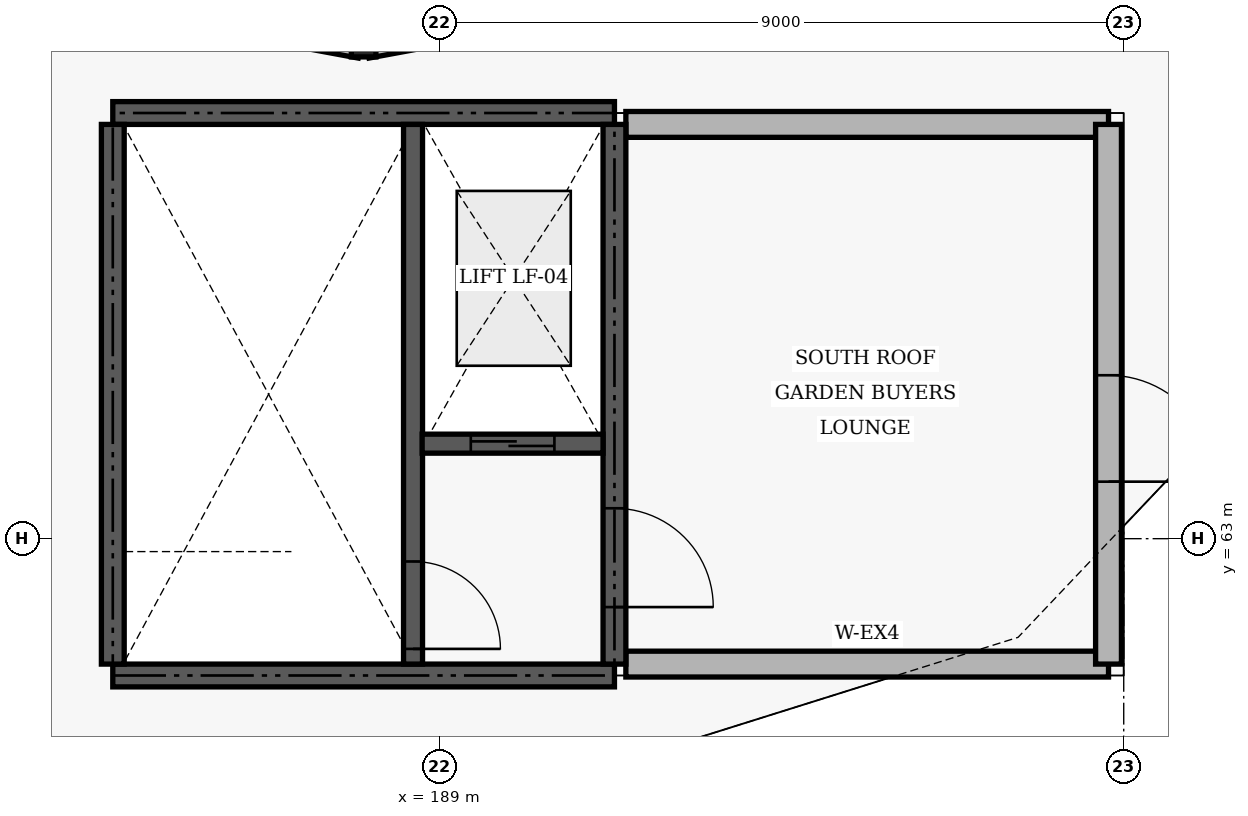
"""IFC4 building model, lengths in metres.
Left out: names, types, materials, properties, quantities, classifications, styles, units other than length and angle.
Written with IfcOpenShell. Run it as: python <this file> out.ifc"""

import sys

from ifc_helpers import new_model, si_unit, direction, frame, frame_2d, origin, origin_2d, place, context, subcontext, project, spatial, rectangle, hollow_circle, extrude, element, fill, save


model = new_model("IFC4")
c1 = context("Model", 3, precision=1e-05, world=origin(), true_north=direction((0.0, 1.0)))
c2 = subcontext(c1, "Body", "Model", "MODEL_VIEW")
j1 = project(units=[si_unit("LENGTHUNIT", "METRE"), si_unit("PLANEANGLEUNIT", "RADIAN")], contexts=[c1])
p1 = place(None, origin())
s1 = spatial("IfcSite", under=j1, at=p1, CompositionType="ELEMENT")
p2 = place(p1, origin())
s2 = spatial("IfcBuilding", under=s1, at=p2, CompositionType="ELEMENT")
p3 = place(p2, frame((0.0, 0.0, 9.6)))
s3 = spatial("IfcBuildingStorey", under=s2, at=p3, CompositionType="ELEMENT", Elevation=9.6)
p4 = place(p3, frame((188.0, 69.5, 0.0), z_axis=(0.0, 0.0, 1.0), x_axis=(0.0, -1.0, 0.0)))
e1 = element("IfcColumn", 1, at=p4, inside=s3, PredefinedType="COLUMN", context=c2, shape_type="SweptSolid", body=[
    extrude(hollow_circle(Radius=0.162, WallThickness=0.016, at=origin_2d()), origin(), (0.0, 0.0, 1.0), 2.38),
])
for number, where, z_axis, x_axis in (
    (2, (185.366, 69.98, 0.0), (0.0, 0.0, 1.0), (0.983, -0.182, 0.0)),
    (3, (188.039, 69.5, 0.0), (0.0, 0.0, 1.0), (0.983, 0.182, 0.0)),
):
    element("IfcWall", number, at=place(p3, frame(where, z_axis=z_axis, x_axis=x_axis)), inside=s3, PredefinedType="SOLIDWALL", context=c2, shape_type="SweptSolid", body=[
        extrude(rectangle(XDim=2.639, YDim=0.36, at=frame_2d((1.319, 0.0))), origin(), (0.0, 0.0, 1.0), 1.95),
    ])
for number, where, z_axis, x_axis in (
    (4, (191.45, 61.35, 0.0), (0.0, 0.0, 1.0), (1.0, 0.0, 0.0)),
    (5, (191.45, 68.45, 0.0), (0.0, 0.0, 1.0), (1.0, 0.0, 0.0)),
):
    element("IfcWall", number, at=place(p3, frame(where, z_axis=z_axis, x_axis=x_axis)), inside=s3, PredefinedType="SOLIDWALL", context=c2, shape_type="SweptSolid", body=[
        extrude(rectangle(XDim=6.35, YDim=0.34, at=frame_2d((3.175, 0.0))), origin(), (0.0, 0.0, 1.0), 2.6),
    ])
p5 = place(p3, frame((197.8, 61.35, 0.0), z_axis=(0.0, 0.0, 1.0), x_axis=(0.0, 1.0, 0.0)))
e6 = element("IfcWall", 6, at=p5, inside=s3, PredefinedType="SOLIDWALL", context=c2, shape_type="SweptSolid", body=[
    extrude(rectangle(XDim=7.1, YDim=0.34, at=frame_2d((3.55, 0.0))), origin(), (0.0, 0.0, 1.0), 2.6),
])
p6 = place(p5, frame((2.4, 0.0, 0.0)))
e7 = element("IfcOpeningElement", 7, at=p6, cuts=e6, PredefinedType="OPENING", context=c2, shape_type="SweptSolid", body=[
    extrude(rectangle(XDim=1.4, YDim=2.2, at=frame_2d((0.7, 1.1))), frame((0.0, 0.18, 0.0), z_axis=(0.0, -1.0, 0.0), x_axis=(1.0, 0.0, 0.0)), (0.0, 0.0, 1.0), 0.36),
])
for number, where, z_axis, x_axis in (
    (8, (184.7, 61.2, 0.0), (0.0, 0.0, 1.0), (1.0, 0.0, 0.0)),
    (9, (184.7, 68.6, 0.0), (0.0, 0.0, 1.0), (1.0, 0.0, 0.0)),
):
    element("IfcWall", number, at=place(p3, frame(where, z_axis=z_axis, x_axis=x_axis)), inside=s3, PredefinedType="SHEAR", context=c2, shape_type="SweptSolid", body=[
        extrude(rectangle(XDim=6.6, YDim=0.3, at=frame_2d((3.3, 0.0))), origin(), (0.0, 0.0, 1.0), 3.7),
    ])
p7 = place(p3, frame((184.7, 61.35, 0.0), z_axis=(0.0, 0.0, 1.0), x_axis=(0.0, 1.0, 0.0)))
e10 = element("IfcWall", 10, at=p7, inside=s3, PredefinedType="SHEAR", context=c2, shape_type="SweptSolid", body=[
    extrude(rectangle(XDim=7.1, YDim=0.3, at=frame_2d((3.55, 0.0))), origin(), (0.0, 0.0, 1.0), 3.7),
])
p8 = place(p3, frame((191.3, 61.35, 0.0), z_axis=(0.0, 0.0, 1.0), x_axis=(0.0, 1.0, 0.0)))
e11 = element("IfcWall", 11, at=p8, inside=s3, PredefinedType="SHEAR", context=c2, shape_type="SweptSolid", body=[
    extrude(rectangle(XDim=7.1, YDim=0.3, at=frame_2d((3.55, 0.0))), origin(), (0.0, 0.0, 1.0), 3.7),
])
p9 = place(p8, frame((0.75, 0.0, 0.0)))
e12 = element("IfcOpeningElement", 12, at=p9, cuts=e11, PredefinedType="OPENING", context=c2, shape_type="SweptSolid", body=[
    extrude(rectangle(XDim=1.3, YDim=2.15, at=frame_2d((0.65, 1.075))), frame((0.0, 0.16, 0.0), z_axis=(0.0, -1.0, 0.0), x_axis=(1.0, 0.0, 0.0)), (0.0, 0.0, 1.0), 0.32),
])
p10 = place(p3, frame((188.65, 61.35, 0.0), z_axis=(0.0, 0.0, 1.0), x_axis=(0.0, 1.0, 0.0)))
e13 = element("IfcWall", 13, at=p10, inside=s3, PredefinedType="SHEAR", context=c2, shape_type="SweptSolid", body=[
    extrude(rectangle(XDim=7.1, YDim=0.25, at=frame_2d((3.55, 0.0))), origin(), (0.0, 0.0, 1.0), 3.7),
])
p11 = place(p10, frame((0.2, 0.0, 0.0)))
e14 = element("IfcOpeningElement", 14, at=p11, cuts=e13, PredefinedType="OPENING", context=c2, shape_type="SweptSolid", body=[
    extrude(rectangle(XDim=1.15, YDim=2.15, at=frame_2d((0.575, 1.075))), frame((0.0, 0.135, 0.0), z_axis=(0.0, -1.0, 0.0), x_axis=(1.0, 0.0, 0.0)), (0.0, 0.0, 1.0), 0.27),
])
p12 = place(p3, frame((188.77, 64.25, 0.0), z_axis=(0.0, 0.0, 1.0), x_axis=(1.0, 0.0, 0.0)))
e15 = element("IfcWall", 15, at=p12, inside=s3, PredefinedType="SHEAR", context=c2, shape_type="SweptSolid", body=[
    extrude(rectangle(XDim=2.38, YDim=0.25, at=frame_2d((1.19, 0.0))), origin(), (0.0, 0.0, 1.0), 3.7),
])
p13 = place(p12, frame((0.64, 0.0, 0.0)))
e16 = element("IfcOpeningElement", 16, at=p13, cuts=e15, PredefinedType="OPENING", context=c2, shape_type="SweptSolid", body=[
    extrude(rectangle(XDim=1.1, YDim=2.15, at=frame_2d((0.55, 1.075))), frame((0.0, 0.135, 0.0), z_axis=(0.0, -1.0, 0.0), x_axis=(1.0, 0.0, 0.0)), (0.0, 0.0, 1.0), 0.27),
])
p14 = place(p6, frame((1.4, 0.0, 0.0), z_axis=(0.0, 0.0, 1.0), x_axis=(-1.0, 0.0, 0.0)))
e17 = element("IfcDoor", 17, at=p14, inside=s3, OperationType="DOUBLE_DOOR_SINGLE_SWING", PredefinedType="DOOR", context=c2, shape_type="SweptSolid", body=[
    extrude(rectangle(XDim=1.4, YDim=2.2, at=frame_2d((0.7, 1.1))), frame((0.0, 0.025, 0.0), z_axis=(0.0, -1.0, 0.0), x_axis=(1.0, 0.0, 0.0)), (0.0, 0.0, 1.0), 0.05),
])
fill(e7, e17)
p15 = place(p9, frame((1.3, 0.0, 0.0), z_axis=(0.0, 0.0, 1.0), x_axis=(-1.0, 0.0, 0.0)))
e18 = element("IfcDoor", 18, at=p15, inside=s3, OperationType="DOUBLE_DOOR_SINGLE_SWING", PredefinedType="DOOR", context=c2, shape_type="SweptSolid", body=[
    extrude(rectangle(XDim=1.3, YDim=2.15, at=frame_2d((0.65, 1.075))), frame((0.0, 0.025, 0.0), z_axis=(0.0, -1.0, 0.0), x_axis=(1.0, 0.0, 0.0)), (0.0, 0.0, 1.0), 0.05),
])
fill(e12, e18)
p16 = place(p11, frame((1.15, 0.0, 0.0), z_axis=(0.0, 0.0, 1.0), x_axis=(-1.0, 0.0, 0.0)))
e19 = element("IfcDoor", 19, at=p16, inside=s3, OperationType="SINGLE_SWING_LEFT", PredefinedType="DOOR", context=c2, shape_type="SweptSolid", body=[
    extrude(rectangle(XDim=1.15, YDim=2.15, at=frame_2d((0.575, 1.075))), frame((0.0, 0.025, 0.0), z_axis=(0.0, -1.0, 0.0), x_axis=(1.0, 0.0, 0.0)), (0.0, 0.0, 1.0), 0.05),
])
fill(e14, e19)
p17 = place(p13, origin())
e20 = element("IfcDoor", 20, at=p17, inside=s3, OperationType="SLIDING_TO_LEFT", PredefinedType="DOOR", context=c2, shape_type="SweptSolid", body=[
    extrude(rectangle(XDim=1.1, YDim=2.15, at=frame_2d((0.55, 1.075))), frame((0.0, 0.025, 0.0), z_axis=(0.0, -1.0, 0.0), x_axis=(1.0, 0.0, 0.0)), (0.0, 0.0, 1.0), 0.05),
])
fill(e16, e20)
save(model, sys.argv[1])
